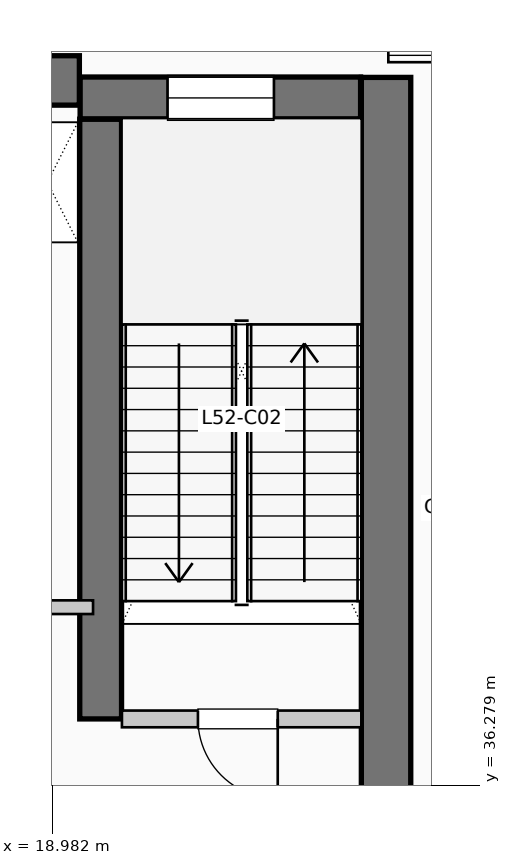
"""IFC4 building model, lengths in metres.
Left out: names, types, materials, properties, quantities, classifications, styles, units other than length and angle.
Written with IfcOpenShell. Run it as: python <this file> out.ifc"""

import sys

from ifc_helpers import new_model, si_unit, direction, frame, frame_2d, origin, place, context, subcontext, project, spatial, rectangle, extrude, element, fill, save


model = new_model("IFC4")
c1 = context("Model", 3, precision=1e-05, world=origin(), true_north=direction((0.0, 1.0)))
c2 = subcontext(c1, "Body", "Model", "MODEL_VIEW")
j1 = project(units=[si_unit("LENGTHUNIT", "METRE"), si_unit("PLANEANGLEUNIT", "RADIAN")], contexts=[c1])
p1 = place(None, origin())
s1 = spatial("IfcSite", under=j1, at=p1, CompositionType="ELEMENT")
p2 = place(p1, origin())
s2 = spatial("IfcBuilding", under=s1, at=p2, CompositionType="ELEMENT")
p3 = place(p2, frame((0.0, 0.0, 215.16)))
s3 = spatial("IfcBuildingStorey", under=s2, at=p3, CompositionType="ELEMENT", Elevation=215.16)
p4 = place(p3, frame((5.36, 45.55, 0.0), z_axis=(0.0, 0.0, 1.0), x_axis=(1.0, 0.0, 0.0)))
e1 = element("IfcWall", 1, at=p4, inside=s3, PredefinedType="SHEAR", context=c2, shape_type="SweptSolid", body=[
    extrude(rectangle(XDim=13.98, YDim=0.65, at=frame_2d((6.99, 0.0))), origin(), (0.0, 0.0, 1.0), 4.62),
])
p5 = place(p3, frame((23.375, 34.95, 0.0), z_axis=(0.0, 0.0, 1.0), x_axis=(0.0, 1.0, 0.0)))
e2 = element("IfcWall", 2, at=p5, inside=s3, PredefinedType="SHEAR", context=c2, shape_type="SweptSolid", body=[
    extrude(rectangle(XDim=10.64, YDim=0.65, at=frame_2d((5.32, 0.0))), origin(), (0.0, 0.0, 1.0), 4.62),
])
p6 = place(p3, frame((19.62, 37.15, 0.0), z_axis=(0.0, 0.0, 1.0), x_axis=(0.0, 1.0, 0.0)))
e3 = element("IfcWall", 3, at=p6, inside=s3, PredefinedType="SHEAR", context=c2, shape_type="SweptSolid", body=[
    extrude(rectangle(XDim=7.89, YDim=0.55, at=frame_2d((3.945, 0.0))), origin(), (0.0, 0.0, 1.0), 4.62),
])
p7 = place(p3, frame((19.35, 45.32, 0.0), z_axis=(0.0, 0.0, 1.0), x_axis=(1.0, 0.0, 0.0)))
e4 = element("IfcWall", 4, at=p7, inside=s3, PredefinedType="SHEAR", context=c2, shape_type="SweptSolid", body=[
    extrude(rectangle(XDim=3.69, YDim=0.55, at=frame_2d((1.845, 0.0))), origin(), (0.0, 0.0, 1.0), 4.62),
])
p8 = place(p7, frame((1.15, 0.0, 1.05)))
e5 = element("IfcOpeningElement", 5, at=p8, cuts=e4, PredefinedType="OPENING", context=c2, shape_type="SweptSolid", body=[
    extrude(rectangle(XDim=1.4, YDim=1.8, at=frame_2d((0.7, 0.9))), frame((0.0, 0.285, 0.0), z_axis=(0.0, -1.0, 0.0), x_axis=(1.0, 0.0, 0.0)), (0.0, 0.0, 1.0), 0.57),
])
p9 = place(p3, frame((19.9, 37.15, 0.0), z_axis=(0.0, 0.0, 1.0), x_axis=(1.0, 0.0, 0.0)))
e6 = element("IfcWall", 6, at=p9, inside=s3, PredefinedType="PARTITIONING", context=c2, shape_type="SweptSolid", body=[
    extrude(rectangle(XDim=3.15, YDim=0.22, at=frame_2d((1.575, 0.0))), origin(), (0.0, 0.0, 1.0), 4.37),
])
p10 = place(p9, frame((2.05, 0.0, 0.0), z_axis=(0.0, 0.0, 1.0), x_axis=(-1.0, 0.0, 0.0)))
e7 = element("IfcOpeningElement", 7, at=p10, cuts=e6, PredefinedType="OPENING", context=c2, shape_type="SweptSolid", body=[
    extrude(rectangle(XDim=1.05, YDim=2.15, at=frame_2d((0.525, 1.075))), frame((0.0, 0.12, 0.0), z_axis=(0.0, -1.0, 0.0), x_axis=(1.0, 0.0, 0.0)), (0.0, 0.0, 1.0), 0.24),
])
p11 = place(p3, frame((17.68, 38.62, 0.0), z_axis=(0.0, 0.0, 1.0), x_axis=(1.0, 0.0, 0.0)))
e8 = element("IfcWall", 8, at=p11, inside=s3, PredefinedType="PARTITIONING", context=c2, shape_type="SweptSolid", body=[
    extrude(rectangle(XDim=1.84, YDim=0.18, at=frame_2d((0.92, 0.0))), origin(), (0.0, 0.0, 1.0), 4.37),
])
p12 = place(p11, frame((0.24, 0.0, 0.0)))
e9 = element("IfcOpeningElement", 9, at=p12, cuts=e8, PredefinedType="OPENING", context=c2, shape_type="SweptSolid", body=[
    extrude(rectangle(XDim=0.92, YDim=2.1, at=frame_2d((0.46, 1.05))), frame((0.0, 0.1, 0.0), z_axis=(0.0, -1.0, 0.0), x_axis=(1.0, 0.0, 0.0)), (0.0, 0.0, 1.0), 0.2),
])
p13 = place(p8, origin())
e10 = element("IfcWindow", 10, at=p13, inside=s3, PartitioningType="SINGLE_PANEL", PredefinedType="WINDOW", context=c2, shape_type="SweptSolid", body=[
    extrude(rectangle(XDim=1.4, YDim=1.8, at=frame_2d((0.7, 0.9))), frame((0.0, 0.03, 0.0), z_axis=(0.0, -1.0, 0.0), x_axis=(1.0, 0.0, 0.0)), (0.0, 0.0, 1.0), 0.06),
])
fill(e5, e10)
p14 = place(p10, origin())
e11 = element("IfcDoor", 11, at=p14, inside=s3, OperationType="SINGLE_SWING_RIGHT", PredefinedType="DOOR", context=c2, shape_type="SweptSolid", body=[
    extrude(rectangle(XDim=1.05, YDim=2.15, at=frame_2d((0.525, 1.075))), frame((0.0, 0.025, 0.0), z_axis=(0.0, -1.0, 0.0), x_axis=(1.0, 0.0, 0.0)), (0.0, 0.0, 1.0), 0.05),
])
fill(e7, e11)
save(model, sys.argv[1])
